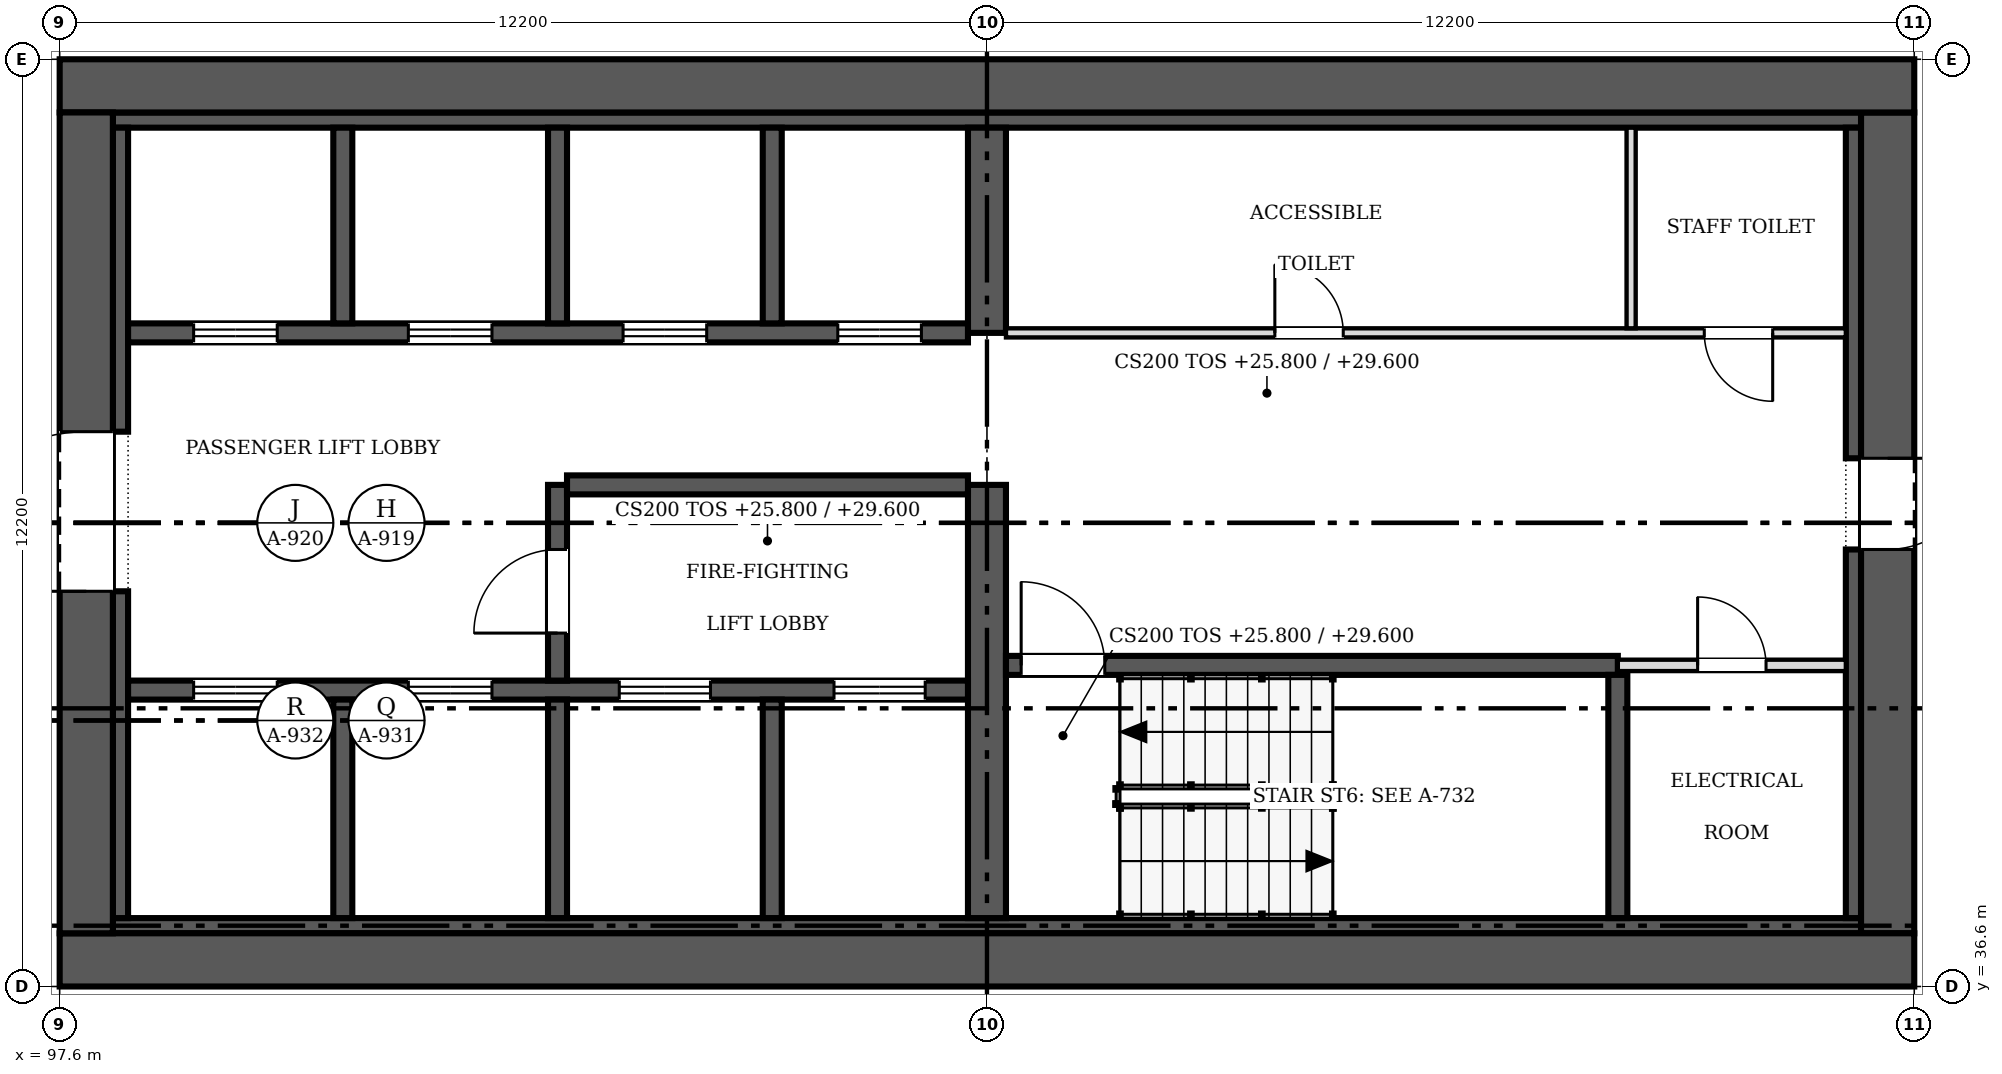
"""IFC4 building model, lengths in metres.
Left out: names, types, materials, properties, quantities, classifications, styles, units other than length and angle.
Written with IfcOpenShell. Run it as: python <this file> out.ifc"""

import sys

from ifc_helpers import new_model, si_unit, direction, frame, frame_2d, origin, place, context, subcontext, project, spatial, rectangle, extrude, source, transform, mapped, element, fill, save


model = new_model("IFC4")
c1 = context("Model", 3, precision=1e-05, world=origin(), true_north=direction((0.0, 1.0)))
c2 = subcontext(c1, "Body", "Model", "MODEL_VIEW")
j1 = project(units=[si_unit("LENGTHUNIT", "METRE"), si_unit("PLANEANGLEUNIT", "RADIAN")], contexts=[c1])
p1 = place(None, origin())
s1 = spatial("IfcSite", under=j1, at=p1, CompositionType="ELEMENT")
p2 = place(p1, origin())
s2 = spatial("IfcBuilding", under=s1, at=p2, CompositionType="ELEMENT")
p3 = place(p2, frame((0.0, 0.0, 25.8)))
s3 = spatial("IfcBuildingStorey", under=s2, at=p3, CompositionType="ELEMENT", Elevation=25.8)
p4 = place(p3, frame((122.0, 36.95, 0.0), z_axis=(0.0, 0.0, 1.0), x_axis=(-1.0, 0.0, 0.0)))
e1 = element("IfcWall", 1, at=p4, inside=s3, PredefinedType="SHEAR", context=c2, shape_type="SweptSolid", body=[
    extrude(rectangle(XDim=24.4, YDim=0.7, at=frame_2d((12.2, 0.0))), origin(), (0.0, 0.0, 1.0), 3.8),
])
p5 = place(p3, frame((97.95, 37.3, 0.0), z_axis=(0.0, 0.0, 1.0), x_axis=(0.0, 1.0, 0.0)))
e2 = element("IfcWall", 2, at=p5, inside=s3, PredefinedType="SHEAR", context=c2, shape_type="SweptSolid", body=[
    extrude(rectangle(XDim=10.8, YDim=0.7, at=frame_2d((5.4, 0.0))), origin(), (0.0, 0.0, 1.0), 3.8),
])
m1 = source(origin(), c2, "Body", "SweptSolid", [
    extrude(rectangle(XDim=2.1, YDim=2.4, at=frame_2d((1.05, 1.2))), frame((0.0, 0.36, 0.0), z_axis=(0.0, -1.0, 0.0), x_axis=(1.0, 0.0, 0.0)), (0.0, 0.0, 1.0), 0.72),
])
p6 = place(p5, frame((4.5, 0.0, 0.0)))
e3 = element("IfcOpeningElement", 3, at=p6, cuts=e2, PredefinedType="OPENING", context=c2, shape_type="MappedRepresentation", body=[
    mapped(m1, transform((0.0, 0.0, 0.0), scale=1.0)),
])
p7 = place(p3, frame((97.6, 48.45, 0.0), z_axis=(0.0, 0.0, 1.0), x_axis=(1.0, 0.0, 0.0)))
e4 = element("IfcWall", 4, at=p7, inside=s3, PredefinedType="SHEAR", context=c2, shape_type="SweptSolid", body=[
    extrude(rectangle(XDim=24.4, YDim=0.7, at=frame_2d((12.2, 0.0))), origin(), (0.0, 0.0, 1.0), 3.8),
])
p8 = place(p3, frame((121.65, 48.1, 0.0), z_axis=(0.0, 0.0, 1.0), x_axis=(0.0, -1.0, 0.0)))
e5 = element("IfcWall", 5, at=p8, inside=s3, PredefinedType="SHEAR", context=c2, shape_type="SweptSolid", body=[
    extrude(rectangle(XDim=10.8, YDim=0.7, at=frame_2d((5.4, 0.0))), origin(), (0.0, 0.0, 1.0), 3.8),
])
m2 = source(origin(), c2, "Body", "SweptSolid", [
    extrude(rectangle(XDim=1.2, YDim=2.1, at=frame_2d((0.6, 1.05))), frame((0.0, 0.36, 0.0), z_axis=(0.0, -1.0, 0.0), x_axis=(1.0, 0.0, 0.0)), (0.0, 0.0, 1.0), 0.72),
])
p9 = place(p8, frame((4.55, 0.0, 0.0)))
e6 = element("IfcOpeningElement", 6, at=p9, cuts=e5, PredefinedType="OPENING", context=c2, shape_type="MappedRepresentation", body=[
    mapped(m2, transform((0.0, 0.0, 0.0), scale=1.0)),
])
for number, where, z_axis, x_axis in (
    (7, (98.3, 37.4, 0.0), (0.0, 0.0, 1.0), (1.0, 0.0, 0.0)),
    (8, (98.3, 48.0, 0.0), (0.0, 0.0, 1.0), (1.0, 0.0, 0.0)),
):
    element("IfcWall", number, at=place(p3, frame(where, z_axis=z_axis, x_axis=x_axis)), inside=s3, PredefinedType="SOLIDWALL", context=c2, shape_type="SweptSolid", body=[
        extrude(rectangle(XDim=23.0, YDim=0.2, at=frame_2d((11.5, 0.0))), origin(), (0.0, 0.0, 1.0), 3.8),
    ])
p10 = place(p3, frame((98.4, 37.5, 0.0), z_axis=(0.0, 0.0, 1.0), x_axis=(0.0, 1.0, 0.0)))
e9 = element("IfcWall", 9, at=p10, inside=s3, PredefinedType="SOLIDWALL", context=c2, shape_type="SweptSolid", body=[
    extrude(rectangle(XDim=4.3, YDim=0.2, at=frame_2d((2.15, 0.0))), origin(), (0.0, 0.0, 1.0), 3.8),
])
p11 = place(p3, frame((98.4, 43.9, 0.0), z_axis=(0.0, 0.0, 1.0), x_axis=(0.0, 1.0, 0.0)))
e10 = element("IfcWall", 10, at=p11, inside=s3, PredefinedType="SOLIDWALL", context=c2, shape_type="SweptSolid", body=[
    extrude(rectangle(XDim=4.0, YDim=0.2, at=frame_2d((2.0, 0.0))), origin(), (0.0, 0.0, 1.0), 3.8),
])
p12 = place(p3, frame((121.2, 37.5, 0.0), z_axis=(0.0, 0.0, 1.0), x_axis=(0.0, 1.0, 0.0)))
e11 = element("IfcWall", 11, at=p12, inside=s3, PredefinedType="SOLIDWALL", context=c2, shape_type="SweptSolid", body=[
    extrude(rectangle(XDim=4.85, YDim=0.2, at=frame_2d((2.425, 0.0))), origin(), (0.0, 0.0, 1.0), 3.8),
])
p13 = place(p3, frame((121.2, 43.55, 0.0), z_axis=(0.0, 0.0, 1.0), x_axis=(0.0, 1.0, 0.0)))
e12 = element("IfcWall", 12, at=p13, inside=s3, PredefinedType="SOLIDWALL", context=c2, shape_type="SweptSolid", body=[
    extrude(rectangle(XDim=4.35, YDim=0.2, at=frame_2d((2.175, 0.0))), origin(), (0.0, 0.0, 1.0), 3.8),
])
p14 = place(p3, frame((109.8, 37.5, 0.0), z_axis=(0.0, 0.0, 1.0), x_axis=(0.0, 1.0, 0.0)))
e13 = element("IfcWall", 13, at=p14, inside=s3, PredefinedType="SHEAR", context=c2, shape_type="SweptSolid", body=[
    extrude(rectangle(XDim=5.7, YDim=0.5, at=frame_2d((2.85, 0.0))), origin(), (0.0, 0.0, 1.0), 3.8),
])
p15 = place(p3, frame((109.8, 45.2, 0.0), z_axis=(0.0, 0.0, 1.0), x_axis=(0.0, 1.0, 0.0)))
e14 = element("IfcWall", 14, at=p15, inside=s3, PredefinedType="SHEAR", context=c2, shape_type="SweptSolid", body=[
    extrude(rectangle(XDim=2.7, YDim=0.5, at=frame_2d((1.35, 0.0))), origin(), (0.0, 0.0, 1.0), 3.8),
])
p16 = place(p3, frame((98.5, 40.5, 0.0), z_axis=(0.0, 0.0, 1.0), x_axis=(1.0, 0.0, 0.0)))
e15 = element("IfcWall", 15, at=p16, inside=s3, PredefinedType="SOLIDWALL", context=c2, shape_type="SweptSolid", body=[
    extrude(rectangle(XDim=11.05, YDim=0.25, at=frame_2d((5.525, 0.0))), origin(), (0.0, 0.0, 1.0), 3.8),
])
m3 = source(origin(), c2, "Body", "SweptSolid", [
    extrude(rectangle(XDim=1.1, YDim=2.1, at=frame_2d((0.55, 1.05))), frame((0.0, 0.135, 0.0), z_axis=(0.0, -1.0, 0.0), x_axis=(1.0, 0.0, 0.0)), (0.0, 0.0, 1.0), 0.27),
])
p17 = place(p16, frame((0.863, 0.0, 0.0)))
e16 = element("IfcOpeningElement", 16, at=p17, cuts=e15, PredefinedType="OPENING", context=c2, shape_type="MappedRepresentation", body=[
    mapped(m3, transform((0.0, 0.0, 0.0), scale=1.0)),
])
p18 = place(p16, frame((3.688, 0.0, 0.0)))
e17 = element("IfcOpeningElement", 17, at=p18, cuts=e15, PredefinedType="OPENING", context=c2, shape_type="MappedRepresentation", body=[
    mapped(m3, transform((0.0, 0.0, 0.0), scale=1.0)),
])
m4 = source(origin(), c2, "Body", "SweptSolid", [
    extrude(rectangle(XDim=1.2, YDim=2.1, at=frame_2d((0.6, 1.05))), frame((0.0, 0.135, 0.0), z_axis=(0.0, -1.0, 0.0), x_axis=(1.0, 0.0, 0.0)), (0.0, 0.0, 1.0), 0.27),
])
p19 = place(p16, frame((6.462, 0.0, 0.0)))
e18 = element("IfcOpeningElement", 18, at=p19, cuts=e15, PredefinedType="OPENING", context=c2, shape_type="MappedRepresentation", body=[
    mapped(m4, transform((0.0, 0.0, 0.0), scale=1.0)),
])
p20 = place(p16, frame((9.288, 0.0, 0.0)))
e19 = element("IfcOpeningElement", 19, at=p20, cuts=e15, PredefinedType="OPENING", context=c2, shape_type="MappedRepresentation", body=[
    mapped(m4, transform((0.0, 0.0, 0.0), scale=1.0)),
])
p21 = place(p3, frame((109.55, 45.2, 0.0), z_axis=(0.0, 0.0, 1.0), x_axis=(-1.0, 0.0, 0.0)))
e20 = element("IfcWall", 20, at=p21, inside=s3, PredefinedType="SOLIDWALL", context=c2, shape_type="SweptSolid", body=[
    extrude(rectangle(XDim=11.05, YDim=0.25, at=frame_2d((5.525, 0.0))), origin(), (0.0, 0.0, 1.0), 3.8),
])
p22 = place(p21, frame((9.087, 0.0, 0.0)))
e21 = element("IfcOpeningElement", 21, at=p22, cuts=e20, PredefinedType="OPENING", context=c2, shape_type="MappedRepresentation", body=[
    mapped(m3, transform((0.0, 0.0, 0.0), scale=1.0)),
])
p23 = place(p21, frame((6.262, 0.0, 0.0)))
e22 = element("IfcOpeningElement", 22, at=p23, cuts=e20, PredefinedType="OPENING", context=c2, shape_type="MappedRepresentation", body=[
    mapped(m3, transform((0.0, 0.0, 0.0), scale=1.0)),
])
p24 = place(p21, frame((3.438, 0.0, 0.0)))
e23 = element("IfcOpeningElement", 23, at=p24, cuts=e20, PredefinedType="OPENING", context=c2, shape_type="MappedRepresentation", body=[
    mapped(m3, transform((0.0, 0.0, 0.0), scale=1.0)),
])
p25 = place(p21, frame((0.613, 0.0, 0.0)))
e24 = element("IfcOpeningElement", 24, at=p25, cuts=e20, PredefinedType="OPENING", context=c2, shape_type="MappedRepresentation", body=[
    mapped(m3, transform((0.0, 0.0, 0.0), scale=1.0)),
])
p26 = place(p3, frame((118.1, 40.825, 0.0), z_axis=(0.0, 0.0, 1.0), x_axis=(-1.0, 0.0, 0.0)))
e25 = element("IfcWall", 25, at=p26, inside=s3, PredefinedType="SOLIDWALL", context=c2, shape_type="SweptSolid", body=[
    extrude(rectangle(XDim=8.05, YDim=0.25, at=frame_2d((4.025, 0.0))), origin(), (0.0, 0.0, 1.0), 3.8),
])
p27 = place(p26, frame((6.75, 0.0, 0.0)))
e26 = element("IfcOpeningElement", 26, at=p27, cuts=e25, PredefinedType="OPENING", context=c2, shape_type="MappedRepresentation", body=[
    mapped(m3, transform((0.0, 0.0, 0.0), scale=1.0)),
])
p28 = place(p3, frame((104.15, 37.5, 0.0), z_axis=(0.0, 0.0, 1.0), x_axis=(0.0, 1.0, 0.0)))
e27 = element("IfcWall", 27, at=p28, inside=s3, PredefinedType="SOLIDWALL", context=c2, shape_type="SweptSolid", body=[
    extrude(rectangle(XDim=2.875, YDim=0.25, at=frame_2d((1.438, 0.0))), origin(), (0.0, 0.0, 1.0), 3.8),
])
p29 = place(p3, frame((104.15, 43.2, 0.0), z_axis=(0.0, 0.0, 1.0), x_axis=(0.0, -1.0, 0.0)))
e28 = element("IfcWall", 28, at=p29, inside=s3, PredefinedType="SOLIDWALL", context=c2, shape_type="SweptSolid", body=[
    extrude(rectangle(XDim=2.575, YDim=0.25, at=frame_2d((1.288, 0.0))), origin(), (0.0, 0.0, 1.0), 3.8),
])
p30 = place(p29, frame((0.85, 0.0, 0.0)))
e29 = element("IfcOpeningElement", 29, at=p30, cuts=e28, PredefinedType="OPENING", context=c2, shape_type="MappedRepresentation", body=[
    mapped(m3, transform((0.0, 0.0, 0.0), scale=1.0)),
])
p31 = place(p3, frame((104.275, 43.2, 0.0), z_axis=(0.0, 0.0, 1.0), x_axis=(1.0, 0.0, 0.0)))
e30 = element("IfcWall", 30, at=p31, inside=s3, PredefinedType="SOLIDWALL", context=c2, shape_type="SweptSolid", body=[
    extrude(rectangle(XDim=5.275, YDim=0.25, at=frame_2d((2.638, 0.0))), origin(), (0.0, 0.0, 1.0), 3.8),
])
p32 = place(p3, frame((118.1, 37.5, 0.0), z_axis=(0.0, 0.0, 1.0), x_axis=(0.0, 1.0, 0.0)))
e31 = element("IfcWall", 31, at=p32, inside=s3, PredefinedType="SOLIDWALL", context=c2, shape_type="SweptSolid", body=[
    extrude(rectangle(XDim=3.2, YDim=0.25, at=frame_2d((1.6, 0.0))), origin(), (0.0, 0.0, 1.0), 3.8),
])
for number, where, z_axis, x_axis in (
    (32, (101.325, 37.5, 0.0), (0.0, 0.0, 1.0), (0.0, 1.0, 0.0)),
    (33, (106.975, 37.5, 0.0), (0.0, 0.0, 1.0), (0.0, 1.0, 0.0)),
):
    element("IfcWall", number, at=place(p3, frame(where, z_axis=z_axis, x_axis=x_axis)), inside=s3, PredefinedType="SOLIDWALL", context=c2, shape_type="SweptSolid", body=[
        extrude(rectangle(XDim=2.875, YDim=0.25, at=frame_2d((1.438, 0.0))), origin(), (0.0, 0.0, 1.0), 3.8),
    ])
for number, where, z_axis, x_axis in (
    (34, (101.325, 45.325, 0.0), (0.0, 0.0, 1.0), (0.0, 1.0, 0.0)),
    (35, (104.15, 45.325, 0.0), (0.0, 0.0, 1.0), (0.0, 1.0, 0.0)),
    (36, (106.975, 45.325, 0.0), (0.0, 0.0, 1.0), (0.0, 1.0, 0.0)),
):
    element("IfcWall", number, at=place(p3, frame(where, z_axis=z_axis, x_axis=x_axis)), inside=s3, PredefinedType="SOLIDWALL", context=c2, shape_type="SweptSolid", body=[
        extrude(rectangle(XDim=2.575, YDim=0.25, at=frame_2d((1.288, 0.0))), origin(), (0.0, 0.0, 1.0), 3.8),
    ])
p33 = place(p3, frame((110.05, 45.2, 0.0), z_axis=(0.0, 0.0, 1.0), x_axis=(1.0, 0.0, 0.0)))
e37 = element("IfcWall", 37, at=p33, inside=s3, PredefinedType="PARTITIONING", context=c2, shape_type="SweptSolid", body=[
    extrude(rectangle(XDim=11.05, YDim=0.12, at=frame_2d((5.525, 0.0))), origin(), (0.0, 0.0, 1.0), 3.6),
])
m5 = source(origin(), c2, "Body", "SweptSolid", [
    extrude(rectangle(XDim=0.9, YDim=2.1, at=frame_2d((0.45, 1.05))), frame((0.0, 0.07, 0.0), z_axis=(0.0, -1.0, 0.0), x_axis=(1.0, 0.0, 0.0)), (0.0, 0.0, 1.0), 0.14),
])
p34 = place(p33, frame((3.538, 0.0, 0.0)))
e38 = element("IfcOpeningElement", 38, at=p34, cuts=e37, PredefinedType="OPENING", context=c2, shape_type="MappedRepresentation", body=[
    mapped(m5, transform((0.0, 0.0, 0.0), scale=1.0)),
])
p35 = place(p33, frame((9.188, 0.0, 0.0)))
e39 = element("IfcOpeningElement", 39, at=p35, cuts=e37, PredefinedType="OPENING", context=c2, shape_type="MappedRepresentation", body=[
    mapped(m5, transform((0.0, 0.0, 0.0), scale=1.0)),
])
p36 = place(p3, frame((121.1, 40.825, 0.0), z_axis=(0.0, 0.0, 1.0), x_axis=(-1.0, 0.0, 0.0)))
e40 = element("IfcWall", 40, at=p36, inside=s3, PredefinedType="PARTITIONING", context=c2, shape_type="SweptSolid", body=[
    extrude(rectangle(XDim=3.0, YDim=0.15, at=frame_2d((1.5, 0.0))), origin(), (0.0, 0.0, 1.0), 3.6),
])
m6 = source(origin(), c2, "Body", "SweptSolid", [
    extrude(rectangle(XDim=0.9, YDim=2.1, at=frame_2d((0.45, 1.05))), frame((0.0, 0.085, 0.0), z_axis=(0.0, -1.0, 0.0), x_axis=(1.0, 0.0, 0.0)), (0.0, 0.0, 1.0), 0.17),
])
p37 = place(p36, frame((1.05, 0.0, 0.0)))
e41 = element("IfcOpeningElement", 41, at=p37, cuts=e40, PredefinedType="OPENING", context=c2, shape_type="MappedRepresentation", body=[
    mapped(m6, transform((0.0, 0.0, 0.0), scale=1.0)),
])
p38 = place(p3, frame((118.275, 45.26, 0.0), z_axis=(0.0, 0.0, 1.0), x_axis=(0.0, 1.0, 0.0)))
e42 = element("IfcWall", 42, at=p38, inside=s3, PredefinedType="PARTITIONING", context=c2, shape_type="SweptSolid", body=[
    extrude(rectangle(XDim=2.64, YDim=0.12, at=frame_2d((1.32, 0.0))), origin(), (0.0, 0.0, 1.0), 3.6),
])
m7 = source(origin(), c2, "Body", "SweptSolid", [
    extrude(rectangle(XDim=2.1, YDim=2.4, at=frame_2d((1.05, 1.2))), frame((0.0, 0.025, 0.0), z_axis=(0.0, -1.0, 0.0), x_axis=(1.0, 0.0, 0.0)), (0.0, 0.0, 1.0), 0.05),
])
p39 = place(p6, origin())
e43 = element("IfcDoor", 43, at=p39, inside=s3, OperationType="DOUBLE_DOOR_SINGLE_SWING", PredefinedType="DOOR", context=c2, shape_type="MappedRepresentation", body=[
    mapped(m7, transform((0.0, 0.0, 0.0), scale=1.0)),
])
fill(e3, e43)
m8 = source(origin(), c2, "Body", "SweptSolid", [
    extrude(rectangle(XDim=1.2, YDim=2.1, at=frame_2d((0.6, 1.05))), frame((0.0, 0.025, 0.0), z_axis=(0.0, -1.0, 0.0), x_axis=(1.0, 0.0, 0.0)), (0.0, 0.0, 1.0), 0.05),
])
p40 = place(p9, origin())
e44 = element("IfcDoor", 44, at=p40, inside=s3, OperationType="SINGLE_SWING_LEFT", PredefinedType="DOOR", context=c2, shape_type="MappedRepresentation", body=[
    mapped(m8, transform((0.0, 0.0, 0.0), scale=1.0)),
])
fill(e6, e44)
m9 = source(origin(), c2, "Body", "SweptSolid", [
    extrude(rectangle(XDim=1.1, YDim=2.1, at=frame_2d((0.55, 1.05))), frame((0.0, 0.025, 0.0), z_axis=(0.0, -1.0, 0.0), x_axis=(1.0, 0.0, 0.0)), (0.0, 0.0, 1.0), 0.05),
])
p41 = place(p17, origin())
e45 = element("IfcDoor", 45, at=p41, inside=s3, OperationType="DOUBLE_DOOR_SLIDING", PredefinedType="DOOR", context=c2, shape_type="MappedRepresentation", body=[
    mapped(m9, transform((0.0, 0.0, 0.0), scale=1.0)),
])
fill(e16, e45)
p42 = place(p18, origin())
e46 = element("IfcDoor", 46, at=p42, inside=s3, OperationType="DOUBLE_DOOR_SLIDING", PredefinedType="DOOR", context=c2, shape_type="MappedRepresentation", body=[
    mapped(m9, transform((0.0, 0.0, 0.0), scale=1.0)),
])
fill(e17, e46)
p43 = place(p19, origin())
e47 = element("IfcDoor", 47, at=p43, inside=s3, OperationType="DOUBLE_DOOR_SLIDING", PredefinedType="DOOR", context=c2, shape_type="MappedRepresentation", body=[
    mapped(m8, transform((0.0, 0.0, 0.0), scale=1.0)),
])
fill(e18, e47)
p44 = place(p20, origin())
e48 = element("IfcDoor", 48, at=p44, inside=s3, OperationType="DOUBLE_DOOR_SLIDING", PredefinedType="DOOR", context=c2, shape_type="MappedRepresentation", body=[
    mapped(m8, transform((0.0, 0.0, 0.0), scale=1.0)),
])
fill(e19, e48)
p45 = place(p22, origin())
e49 = element("IfcDoor", 49, at=p45, inside=s3, OperationType="DOUBLE_DOOR_SLIDING", PredefinedType="DOOR", context=c2, shape_type="MappedRepresentation", body=[
    mapped(m9, transform((0.0, 0.0, 0.0), scale=1.0)),
])
fill(e21, e49)
p46 = place(p23, origin())
e50 = element("IfcDoor", 50, at=p46, inside=s3, OperationType="DOUBLE_DOOR_SLIDING", PredefinedType="DOOR", context=c2, shape_type="MappedRepresentation", body=[
    mapped(m9, transform((0.0, 0.0, 0.0), scale=1.0)),
])
fill(e22, e50)
p47 = place(p24, origin())
e51 = element("IfcDoor", 51, at=p47, inside=s3, OperationType="DOUBLE_DOOR_SLIDING", PredefinedType="DOOR", context=c2, shape_type="MappedRepresentation", body=[
    mapped(m9, transform((0.0, 0.0, 0.0), scale=1.0)),
])
fill(e23, e51)
p48 = place(p25, origin())
e52 = element("IfcDoor", 52, at=p48, inside=s3, OperationType="DOUBLE_DOOR_SLIDING", PredefinedType="DOOR", context=c2, shape_type="MappedRepresentation", body=[
    mapped(m9, transform((0.0, 0.0, 0.0), scale=1.0)),
])
fill(e24, e52)
p49 = place(p27, origin())
e53 = element("IfcDoor", 53, at=p49, inside=s3, OperationType="SINGLE_SWING_RIGHT", PredefinedType="DOOR", context=c2, shape_type="MappedRepresentation", body=[
    mapped(m9, transform((0.0, 0.0, 0.0), scale=1.0)),
])
fill(e26, e53)
p50 = place(p30, origin())
e54 = element("IfcDoor", 54, at=p50, inside=s3, OperationType="SINGLE_SWING_RIGHT", PredefinedType="DOOR", context=c2, shape_type="MappedRepresentation", body=[
    mapped(m9, transform((0.0, 0.0, 0.0), scale=1.0)),
])
fill(e29, e54)
m10 = source(origin(), c2, "Body", "SweptSolid", [
    extrude(rectangle(XDim=0.9, YDim=2.1, at=frame_2d((0.45, 1.05))), frame((0.0, 0.025, 0.0), z_axis=(0.0, -1.0, 0.0), x_axis=(1.0, 0.0, 0.0)), (0.0, 0.0, 1.0), 0.05),
])
p51 = place(p34, origin())
e55 = element("IfcDoor", 55, at=p51, inside=s3, OperationType="SINGLE_SWING_LEFT", PredefinedType="DOOR", context=c2, shape_type="MappedRepresentation", body=[
    mapped(m10, transform((0.0, 0.0, 0.0), scale=1.0)),
])
fill(e38, e55)
p52 = place(p35, origin())
e56 = element("IfcDoor", 56, at=p52, inside=s3, OperationType="SINGLE_SWING_RIGHT", PredefinedType="DOOR", context=c2, shape_type="MappedRepresentation", body=[
    mapped(m10, transform((0.0, 0.0, 0.0), scale=1.0)),
])
fill(e39, e56)
p53 = place(p37, origin())
e57 = element("IfcDoor", 57, at=p53, inside=s3, OperationType="SINGLE_SWING_RIGHT", PredefinedType="DOOR", context=c2, shape_type="MappedRepresentation", body=[
    mapped(m10, transform((0.0, 0.0, 0.0), scale=1.0)),
])
fill(e41, e57)
save(model, sys.argv[1])
